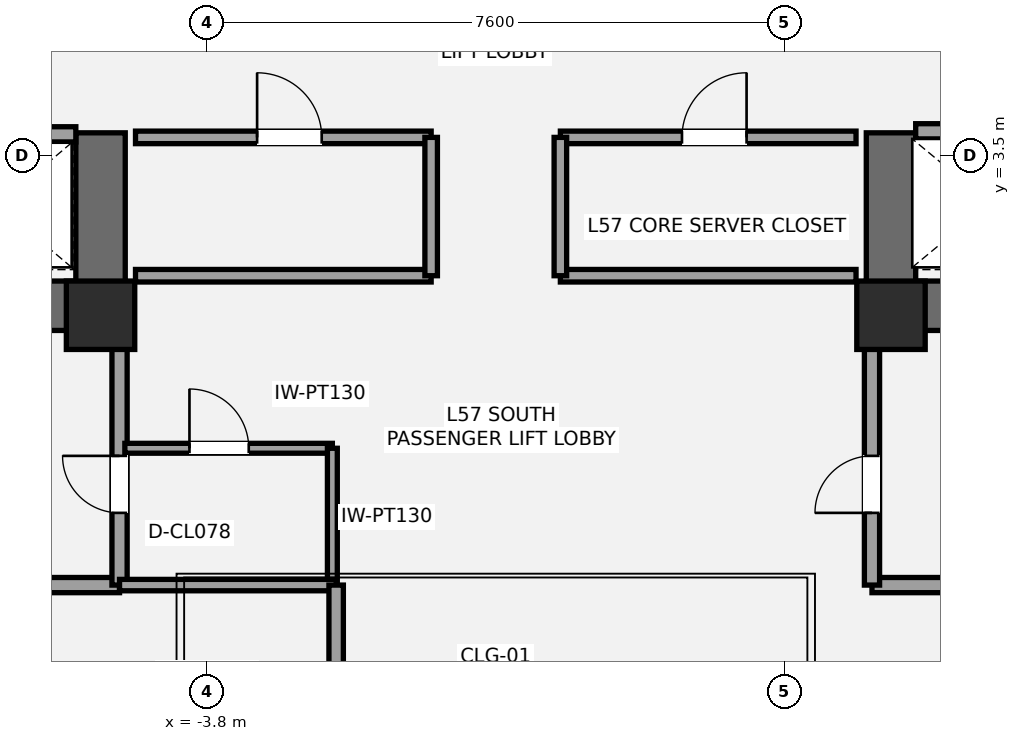
"""IFC4 building model, lengths in metres.
Left out: names, types, materials, properties, quantities, classifications, styles, units other than length and angle.
Written with IfcOpenShell. Run it as: python <this file> out.ifc"""

import sys

from ifc_helpers import new_model, si_unit, direction, frame, frame_2d, origin, origin_2d, place, context, subcontext, project, spatial, rectangle, extrude, element, fill, save


model = new_model("IFC4")
c1 = context("Model", 3, precision=1e-05, world=origin(), true_north=direction((0.0, 1.0)))
c2 = subcontext(c1, "Body", "Model", "MODEL_VIEW")
j1 = project(units=[si_unit("LENGTHUNIT", "METRE"), si_unit("PLANEANGLEUNIT", "RADIAN")], contexts=[c1])
p1 = place(None, origin())
s1 = spatial("IfcSite", under=j1, at=p1, CompositionType="ELEMENT")
p2 = place(p1, origin())
s2 = spatial("IfcBuilding", under=s1, at=p2, CompositionType="ELEMENT")
p3 = place(p2, frame((0.0, 0.0, 205.9)))
s3 = spatial("IfcBuildingStorey", under=s2, at=p3, CompositionType="ELEMENT", Elevation=205.9)
p4 = place(p3, frame((-4.875, 1.525, 0.0), z_axis=(0.0, 0.0, 1.0), x_axis=(-1.0, 0.0, 0.0)))
e1 = element("IfcWall", 1, at=p4, inside=s3, PredefinedType="SHEAR", context=c2, shape_type="SweptSolid", body=[
    extrude(rectangle(XDim=8.925, YDim=0.65, at=frame_2d((4.462, 0.0))), origin(), (0.0, 0.0, 1.0), 4.1),
])
p5 = place(p4, frame((5.425, 0.0, 0.0)))
e2 = element("IfcOpeningElement", 2, at=p5, cuts=e1, PredefinedType="OPENING", context=c2, shape_type="SweptSolid", body=[
    extrude(rectangle(XDim=1.05, YDim=2.15, at=frame_2d((0.525, 1.075))), frame((0.0, 0.335, 0.0), z_axis=(0.0, -1.0, 0.0), x_axis=(1.0, 0.0, 0.0)), (0.0, 0.0, 1.0), 0.67),
])
p6 = place(p4, frame((3.755, 0.0, 0.0)))
e3 = element("IfcOpeningElement", 3, at=p6, cuts=e1, PredefinedType="OPENING", context=c2, shape_type="SweptSolid", body=[
    extrude(rectangle(XDim=1.1, YDim=2.2, at=frame_2d((0.55, 1.1))), frame((0.0, 0.335, 0.0), z_axis=(0.0, -1.0, 0.0), x_axis=(1.0, 0.0, 0.0)), (0.0, 0.0, 1.0), 0.67),
])
p7 = place(p3, frame((-5.2, 1.2, 0.0), z_axis=(0.0, 0.0, 1.0), x_axis=(0.0, 1.0, 0.0)))
e4 = element("IfcWall", 4, at=p7, inside=s3, PredefinedType="SHEAR", context=c2, shape_type="SweptSolid", body=[
    extrude(rectangle(XDim=2.6, YDim=0.65, at=frame_2d((1.3, 0.0))), origin(), (0.0, 0.0, 1.0), 4.1),
])
p8 = place(p3, frame((13.8, 1.525, 0.0), z_axis=(0.0, 0.0, 1.0), x_axis=(-1.0, 0.0, 0.0)))
e5 = element("IfcWall", 5, at=p8, inside=s3, PredefinedType="SHEAR", context=c2, shape_type="SweptSolid", body=[
    extrude(rectangle(XDim=8.925, YDim=0.65, at=frame_2d((4.462, 0.0))), origin(), (0.0, 0.0, 1.0), 4.1),
])
p9 = place(p8, frame((2.45, 0.0, 0.0)))
e6 = element("IfcOpeningElement", 6, at=p9, cuts=e5, PredefinedType="OPENING", context=c2, shape_type="SweptSolid", body=[
    extrude(rectangle(XDim=1.05, YDim=2.15, at=frame_2d((0.525, 1.075))), frame((0.0, 0.335, 0.0), z_axis=(0.0, -1.0, 0.0), x_axis=(1.0, 0.0, 0.0)), (0.0, 0.0, 1.0), 0.67),
])
p10 = place(p8, frame((4.45, 0.0, 0.0)))
e7 = element("IfcOpeningElement", 7, at=p10, cuts=e5, PredefinedType="OPENING", context=c2, shape_type="SweptSolid", body=[
    extrude(rectangle(XDim=1.1, YDim=2.2, at=frame_2d((0.55, 1.1))), frame((0.0, 0.335, 0.0), z_axis=(0.0, -1.0, 0.0), x_axis=(1.0, 0.0, 0.0)), (0.0, 0.0, 1.0), 0.67),
])
p11 = place(p3, frame((5.2, 1.2, 0.0), z_axis=(0.0, 0.0, 1.0), x_axis=(0.0, 1.0, 0.0)))
e8 = element("IfcWall", 8, at=p11, inside=s3, PredefinedType="SHEAR", context=c2, shape_type="SweptSolid", body=[
    extrude(rectangle(XDim=2.6, YDim=0.65, at=frame_2d((1.3, 0.0))), origin(), (0.0, 0.0, 1.0), 4.1),
])
for number, where, z_axis, x_axis in (
    (9, (-5.2, 1.4, 0.0), (0.0, 0.0, 1.0), (1.0, 0.0, 0.0)),
    (10, (5.2, 1.4, 0.0), (0.0, 0.0, 1.0), (1.0, 0.0, 0.0)),
):
    element("IfcColumn", number, at=place(p3, frame(where, z_axis=z_axis, x_axis=x_axis)), inside=s3, PredefinedType="COLUMN", context=c2, shape_type="SweptSolid", body=[
        extrude(rectangle(XDim=0.9, YDim=0.9, at=origin_2d()), origin(), (0.0, 0.0, 1.0), 4.1),
    ])
p12 = place(p3, frame((-7.2, -2.15, 0.0), z_axis=(0.0, 0.0, 1.0), x_axis=(1.0, 0.0, 0.0)))
e11 = element("IfcWall", 11, at=p12, inside=s3, PredefinedType="SOLIDWALL", context=c2, shape_type="SweptSolid", body=[
    extrude(rectangle(XDim=2.25, YDim=0.2, at=frame_2d((1.125, 0.0))), origin(), (0.0, 0.0, 1.0), 3.373),
])
p13 = place(p3, frame((-4.95, -2.15, 0.0), z_axis=(0.0, 0.0, 1.0), x_axis=(0.0, 1.0, 0.0)))
e12 = element("IfcWall", 12, at=p13, inside=s3, PredefinedType="SOLIDWALL", context=c2, shape_type="SweptSolid", body=[
    extrude(rectangle(XDim=3.4, YDim=0.2, at=frame_2d((1.7, 0.0))), origin(), (0.0, 0.0, 1.0), 3.373),
])
p14 = place(p13, frame((0.95, 0.0, 0.0)))
e13 = element("IfcOpeningElement", 13, at=p14, cuts=e12, PredefinedType="OPENING", context=c2, shape_type="SweptSolid", body=[
    extrude(rectangle(XDim=0.75, YDim=2.1, at=frame_2d((0.375, 1.05))), frame((0.0, 0.11, 0.0), z_axis=(0.0, -1.0, 0.0), x_axis=(1.0, 0.0, 0.0)), (0.0, 0.0, 1.0), 0.22),
])
p15 = place(p3, frame((4.95, -2.15, 0.0), z_axis=(0.0, 0.0, 1.0), x_axis=(1.0, 0.0, 0.0)))
e14 = element("IfcWall", 14, at=p15, inside=s3, PredefinedType="SOLIDWALL", context=c2, shape_type="SweptSolid", body=[
    extrude(rectangle(XDim=2.25, YDim=0.2, at=frame_2d((1.125, 0.0))), origin(), (0.0, 0.0, 1.0), 3.92),
])
p16 = place(p3, frame((4.95, -2.15, 0.0), z_axis=(0.0, 0.0, 1.0), x_axis=(0.0, 1.0, 0.0)))
e15 = element("IfcWall", 15, at=p16, inside=s3, PredefinedType="SOLIDWALL", context=c2, shape_type="SweptSolid", body=[
    extrude(rectangle(XDim=3.4, YDim=0.2, at=frame_2d((1.7, 0.0))), origin(), (0.0, 0.0, 1.0), 3.373),
])
p17 = place(p16, frame((0.95, 0.0, 0.0)))
e16 = element("IfcOpeningElement", 16, at=p17, cuts=e15, PredefinedType="OPENING", context=c2, shape_type="SweptSolid", body=[
    extrude(rectangle(XDim=0.75, YDim=2.1, at=frame_2d((0.375, 1.05))), frame((0.0, 0.11, 0.0), z_axis=(0.0, -1.0, 0.0), x_axis=(1.0, 0.0, 0.0)), (0.0, 0.0, 1.0), 0.22),
])
p18 = place(p3, frame((-4.88, -0.35, 0.0), z_axis=(0.0, 0.0, 1.0), x_axis=(1.0, 0.0, 0.0)))
e17 = element("IfcWall", 17, at=p18, inside=s3, PredefinedType="PARTITIONING", context=c2, shape_type="SweptSolid", body=[
    extrude(rectangle(XDim=2.73, YDim=0.13, at=frame_2d((1.365, 0.0))), origin(), (0.0, 0.0, 1.0), 3.373),
])
p19 = place(p18, frame((0.85, 0.0, 0.0)))
e18 = element("IfcOpeningElement", 18, at=p19, cuts=e17, PredefinedType="OPENING", context=c2, shape_type="SweptSolid", body=[
    extrude(rectangle(XDim=0.78, YDim=2.1, at=frame_2d((0.39, 1.05))), frame((0.0, 0.075, 0.0), z_axis=(0.0, -1.0, 0.0), x_axis=(1.0, 0.0, 0.0)), (0.0, 0.0, 1.0), 0.15),
])
p20 = place(p3, frame((-2.15, -2.15, 0.0), z_axis=(0.0, 0.0, 1.0), x_axis=(0.0, 1.0, 0.0)))
e19 = element("IfcWall", 19, at=p20, inside=s3, PredefinedType="PARTITIONING", context=c2, shape_type="SweptSolid", body=[
    extrude(rectangle(XDim=1.8, YDim=0.13, at=frame_2d((0.9, 0.0))), origin(), (0.0, 0.0, 1.0), 3.92),
])
p21 = place(p3, frame((-9.78, 3.78, 0.0), z_axis=(0.0, 0.0, 1.0), x_axis=(1.0, 0.0, 0.0)))
e20 = element("IfcWall", 20, at=p21, inside=s3, PredefinedType="SOLIDWALL", context=c2, shape_type="SweptSolid", body=[
    extrude(rectangle(XDim=4.255, YDim=0.2, at=frame_2d((2.127, 0.0))), origin(), (0.0, 0.0, 1.0), 3.92),
])
p22 = place(p21, frame((2.72, 0.0, 0.0)))
e21 = element("IfcOpeningElement", 21, at=p22, cuts=e20, PredefinedType="OPENING", context=c2, shape_type="SweptSolid", body=[
    extrude(rectangle(XDim=1.1, YDim=2.2, at=frame_2d((0.55, 1.1))), frame((0.0, 0.11, 0.0), z_axis=(0.0, -1.0, 0.0), x_axis=(1.0, 0.0, 0.0)), (0.0, 0.0, 1.0), 0.22),
])
p23 = place(p3, frame((5.525, 3.82, 0.0), z_axis=(0.0, 0.0, 1.0), x_axis=(1.0, 0.0, 0.0)))
e22 = element("IfcWall", 22, at=p23, inside=s3, PredefinedType="SOLIDWALL", context=c2, shape_type="SweptSolid", body=[
    extrude(rectangle(XDim=4.255, YDim=0.2, at=frame_2d((2.127, 0.0))), origin(), (0.0, 0.0, 1.0), 3.92),
])
p24 = place(p23, frame((0.65, 0.0, 0.0)))
e23 = element("IfcOpeningElement", 23, at=p24, cuts=e22, PredefinedType="OPENING", context=c2, shape_type="SweptSolid", body=[
    extrude(rectangle(XDim=1.2, YDim=2.2, at=frame_2d((0.6, 1.1))), frame((0.0, 0.11, 0.0), z_axis=(0.0, -1.0, 0.0), x_axis=(1.0, 0.0, 0.0)), (0.0, 0.0, 1.0), 0.22),
])
p25 = place(p3, frame((-4.74, 1.92, 0.0), z_axis=(0.0, 0.0, 1.0), x_axis=(1.0, 0.0, 0.0)))
e24 = element("IfcWall", 24, at=p25, inside=s3, PredefinedType="PARTITIONING", context=c2, shape_type="SweptSolid", body=[
    extrude(rectangle(XDim=3.89, YDim=0.165, at=frame_2d((1.945, 0.0))), origin(), (0.0, 0.0, 1.0), 3.06),
])
p26 = place(p3, frame((-4.74, 3.74, 0.0), z_axis=(0.0, 0.0, 1.0), x_axis=(1.0, 0.0, 0.0)))
e25 = element("IfcWall", 25, at=p26, inside=s3, PredefinedType="PARTITIONING", context=c2, shape_type="SweptSolid", body=[
    extrude(rectangle(XDim=3.89, YDim=0.165, at=frame_2d((1.945, 0.0))), origin(), (0.0, 0.0, 1.0), 3.92),
])
p27 = place(p26, frame((1.6, 0.0, 0.0)))
e26 = element("IfcOpeningElement", 26, at=p27, cuts=e25, PredefinedType="OPENING", context=c2, shape_type="SweptSolid", body=[
    extrude(rectangle(XDim=0.85, YDim=2.1, at=frame_2d((0.425, 1.05))), frame((0.0, 0.093, 0.0), z_axis=(0.0, -1.0, 0.0), x_axis=(1.0, 0.0, 0.0)), (0.0, 0.0, 1.0), 0.185),
])
p28 = place(p3, frame((-0.85, 1.92, 0.0), z_axis=(0.0, 0.0, 1.0), x_axis=(0.0, 1.0, 0.0)))
e27 = element("IfcWall", 27, at=p28, inside=s3, PredefinedType="PARTITIONING", context=c2, shape_type="SweptSolid", body=[
    extrude(rectangle(XDim=1.82, YDim=0.165, at=frame_2d((0.91, 0.0))), origin(), (0.0, 0.0, 1.0), 3.92),
])
p29 = place(p3, frame((0.85, 1.92, 0.0), z_axis=(0.0, 0.0, 1.0), x_axis=(1.0, 0.0, 0.0)))
e28 = element("IfcWall", 28, at=p29, inside=s3, PredefinedType="PARTITIONING", context=c2, shape_type="SweptSolid", body=[
    extrude(rectangle(XDim=3.89, YDim=0.165, at=frame_2d((1.945, 0.0))), origin(), (0.0, 0.0, 1.0), 3.06),
])
p30 = place(p3, frame((0.85, 3.74, 0.0), z_axis=(0.0, 0.0, 1.0), x_axis=(1.0, 0.0, 0.0)))
e29 = element("IfcWall", 29, at=p30, inside=s3, PredefinedType="PARTITIONING", context=c2, shape_type="SweptSolid", body=[
    extrude(rectangle(XDim=3.89, YDim=0.165, at=frame_2d((1.945, 0.0))), origin(), (0.0, 0.0, 1.0), 3.92),
])
p31 = place(p30, frame((1.6, 0.0, 0.0)))
e30 = element("IfcOpeningElement", 30, at=p31, cuts=e29, PredefinedType="OPENING", context=c2, shape_type="SweptSolid", body=[
    extrude(rectangle(XDim=0.85, YDim=2.1, at=frame_2d((0.425, 1.05))), frame((0.0, 0.093, 0.0), z_axis=(0.0, -1.0, 0.0), x_axis=(1.0, 0.0, 0.0)), (0.0, 0.0, 1.0), 0.185),
])
p32 = place(p3, frame((0.85, 1.92, 0.0), z_axis=(0.0, 0.0, 1.0), x_axis=(0.0, 1.0, 0.0)))
e31 = element("IfcWall", 31, at=p32, inside=s3, PredefinedType="PARTITIONING", context=c2, shape_type="SweptSolid", body=[
    extrude(rectangle(XDim=1.82, YDim=0.165, at=frame_2d((0.91, 0.0))), origin(), (0.0, 0.0, 1.0), 3.92),
])
p33 = place(p3, frame((-4.95, -2.15, 0.0), z_axis=(0.0, 0.0, 1.0), x_axis=(1.0, 0.0, 0.0)))
e32 = element("IfcWall", 32, at=p33, inside=s3, PredefinedType="PLUMBINGWALL", context=c2, shape_type="SweptSolid", body=[
    extrude(rectangle(XDim=2.85, YDim=0.15, at=frame_2d((1.425, 0.0))), origin(), (0.0, 0.0, 1.0), 3.373),
])
p34 = place(p3, frame((-2.1, -4.05, 0.0), z_axis=(0.0, 0.0, 1.0), x_axis=(0.0, 1.0, 0.0)))
e33 = element("IfcWall", 33, at=p34, inside=s3, PredefinedType="PLUMBINGWALL", context=c2, shape_type="SweptSolid", body=[
    extrude(rectangle(XDim=1.9, YDim=0.19, at=frame_2d((0.95, 0.0))), origin(), (0.0, 0.0, 1.0), 3.373),
])
p35 = place(p14, origin())
e34 = element("IfcDoor", 34, at=p35, inside=s3, OperationType="SINGLE_SWING_RIGHT", PredefinedType="DOOR", context=c2, shape_type="SweptSolid", body=[
    extrude(rectangle(XDim=0.75, YDim=2.1, at=frame_2d((0.375, 1.05))), frame((0.0, 0.025, 0.0), z_axis=(0.0, -1.0, 0.0), x_axis=(1.0, 0.0, 0.0)), (0.0, 0.0, 1.0), 0.05),
])
fill(e13, e34)
p36 = place(p17, origin())
e35 = element("IfcDoor", 35, at=p36, inside=s3, OperationType="SINGLE_SWING_LEFT", PredefinedType="DOOR", context=c2, shape_type="SweptSolid", body=[
    extrude(rectangle(XDim=0.75, YDim=2.1, at=frame_2d((0.375, 1.05))), frame((0.0, 0.025, 0.0), z_axis=(0.0, -1.0, 0.0), x_axis=(1.0, 0.0, 0.0)), (0.0, 0.0, 1.0), 0.05),
])
fill(e16, e35)
p37 = place(p19, origin())
e36 = element("IfcDoor", 36, at=p37, inside=s3, OperationType="SINGLE_SWING_LEFT", PredefinedType="DOOR", context=c2, shape_type="SweptSolid", body=[
    extrude(rectangle(XDim=0.78, YDim=2.1, at=frame_2d((0.39, 1.05))), frame((0.0, 0.025, 0.0), z_axis=(0.0, -1.0, 0.0), x_axis=(1.0, 0.0, 0.0)), (0.0, 0.0, 1.0), 0.05),
])
fill(e18, e36)
p38 = place(p27, origin())
e37 = element("IfcDoor", 37, at=p38, inside=s3, OperationType="SINGLE_SWING_LEFT", PredefinedType="DOOR", context=c2, shape_type="SweptSolid", body=[
    extrude(rectangle(XDim=0.85, YDim=2.1, at=frame_2d((0.425, 1.05))), frame((0.0, 0.025, 0.0), z_axis=(0.0, -1.0, 0.0), x_axis=(1.0, 0.0, 0.0)), (0.0, 0.0, 1.0), 0.05),
])
fill(e26, e37)
p39 = place(p31, origin())
e38 = element("IfcDoor", 38, at=p39, inside=s3, OperationType="SINGLE_SWING_RIGHT", PredefinedType="DOOR", context=c2, shape_type="SweptSolid", body=[
    extrude(rectangle(XDim=0.85, YDim=2.1, at=frame_2d((0.425, 1.05))), frame((0.0, 0.025, 0.0), z_axis=(0.0, -1.0, 0.0), x_axis=(1.0, 0.0, 0.0)), (0.0, 0.0, 1.0), 0.05),
])
fill(e30, e38)
save(model, sys.argv[1])
